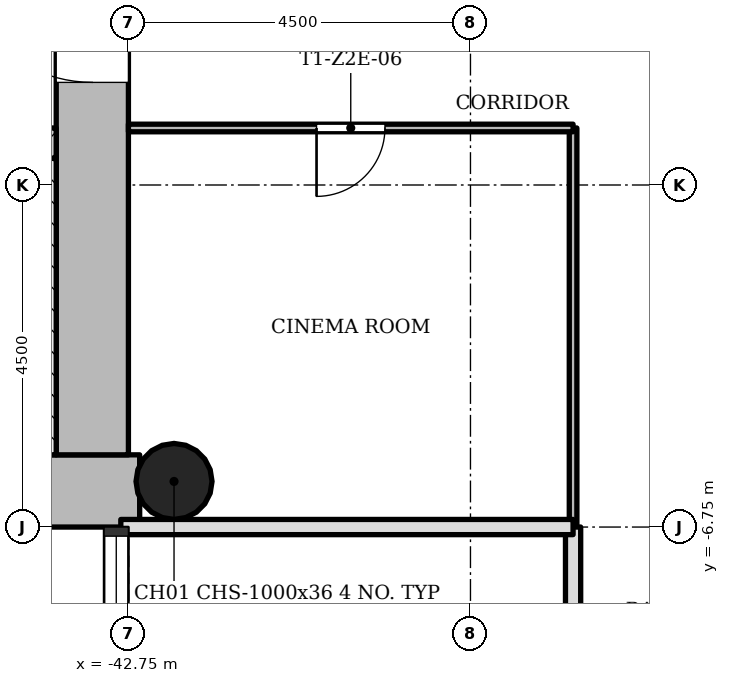
"""IFC4 building model, lengths in metres.
Left out: names, types, materials, properties, quantities, classifications, styles, units other than length and angle.
Written with IfcOpenShell. Run it as: python <this file> out.ifc"""

import sys

from ifc_helpers import new_model, si_unit, direction, frame, frame_2d, origin, origin_2d, place, context, subcontext, project, spatial, rectangle, hollow_circle, extrude, element, fill, save


model = new_model("IFC4")
c1 = context("Model", 3, precision=1e-05, world=origin(), true_north=direction((0.0, 1.0)))
c2 = subcontext(c1, "Body", "Model", "MODEL_VIEW")
j1 = project(units=[si_unit("LENGTHUNIT", "METRE"), si_unit("PLANEANGLEUNIT", "RADIAN")], contexts=[c1])
p1 = place(None, origin())
s1 = spatial("IfcSite", under=j1, at=p1, CompositionType="ELEMENT")
p2 = place(p1, origin())
s2 = spatial("IfcBuilding", under=s1, at=p2, CompositionType="ELEMENT")
p3 = place(p2, frame((0.0, 0.0, 103.8)))
s3 = spatial("IfcBuildingStorey", under=s2, at=p3, CompositionType="ELEMENT", Elevation=103.8)
p4 = place(p3, frame((-51.298, -6.275, 0.0), z_axis=(0.0, 0.0, 1.0), x_axis=(1.0, 0.0, 0.0)))
e1 = element("IfcWall", 1, at=p4, inside=s3, PredefinedType="SHEAR", context=c2, shape_type="SweptSolid", body=[
    extrude(rectangle(XDim=8.696, YDim=0.95, at=frame_2d((4.348, 0.0))), origin(), (0.0, 0.0, 1.0), 3.4),
])
p5 = place(p3, frame((-43.225, -5.8, 0.0), z_axis=(0.0, 0.0, 1.0), x_axis=(0.0, 1.0, 0.0)))
e2 = element("IfcWall", 2, at=p5, inside=s3, PredefinedType="SHEAR", context=c2, shape_type="SweptSolid", body=[
    extrude(rectangle(XDim=12.55, YDim=0.95, at=frame_2d((6.275, 0.0))), origin(), (0.0, 0.0, 1.0), 3.4),
])
p6 = place(p5, frame((4.9, 0.0, 0.0)))
e3 = element("IfcOpeningElement", 3, at=p6, cuts=e2, PredefinedType="OPENING", context=c2, shape_type="SweptSolid", body=[
    extrude(rectangle(XDim=1.8, YDim=2.1, at=frame_2d((0.9, 1.05))), frame((0.0, 0.485, 0.0), z_axis=(0.0, -1.0, 0.0), x_axis=(1.0, 0.0, 0.0)), (0.0, 0.0, 1.0), 0.97),
])
p7 = place(p3, frame((-50.8, -1.7, 0.0), z_axis=(0.0, 0.0, 1.0), x_axis=(1.0, 0.0, 0.0)))
e4 = element("IfcWall", 4, at=p7, inside=s3, PredefinedType="SHEAR", context=c2, shape_type="SweptSolid", body=[
    extrude(rectangle(XDim=7.1, YDim=0.4, at=frame_2d((3.55, 0.0))), origin(), (0.0, 0.0, 1.0), 3.4),
])
p8 = place(p7, frame((5.5, 0.0, 0.0)))
e5 = element("IfcOpeningElement", 5, at=p8, cuts=e4, PredefinedType="OPENING", context=c2, shape_type="SweptSolid", body=[
    extrude(rectangle(XDim=0.9, YDim=2.1, at=frame_2d((0.45, 1.05))), frame((0.0, 0.21, 0.0), z_axis=(0.0, -1.0, 0.0), x_axis=(1.0, 0.0, 0.0)), (0.0, 0.0, 1.0), 0.42),
])
p9 = place(p3, frame((-42.15, -6.15, 0.0), z_axis=(0.0, 0.0, 1.0), x_axis=(1.0, 0.0, 0.0)))
e6 = element("IfcColumn", 6, at=p9, inside=s3, PredefinedType="COLUMN", context=c2, shape_type="SweptSolid", body=[
    extrude(hollow_circle(Radius=0.5, WallThickness=0.036, at=origin_2d()), origin(), (0.0, 0.0, 1.0), 3.4),
])
p10 = place(p3, frame((-36.9, -6.75, 0.0), z_axis=(0.0, 0.0, 1.0), x_axis=(0.0, 1.0, 0.0)))
e7 = element("IfcWall", 7, at=p10, inside=s3, PredefinedType="PARTITIONING", context=c2, shape_type="SweptSolid", body=[
    extrude(rectangle(XDim=5.25, YDim=0.1, at=frame_2d((2.625, 0.0))), origin(), (0.0, 0.0, 1.0), 3.0),
])
p11 = place(p3, frame((-36.9, -8.55, 0.0), z_axis=(0.0, 0.0, 1.0), x_axis=(0.0, 1.0, 0.0)))
e8 = element("IfcWall", 8, at=p11, inside=s3, PredefinedType="SOLIDWALL", context=c2, shape_type="SweptSolid", body=[
    extrude(rectangle(XDim=1.8, YDim=0.2, at=frame_2d((0.9, 0.0))), origin(), (0.0, 0.0, 1.0), 3.0),
])
p12 = place(p3, frame((-42.85, -6.75, 0.0), z_axis=(0.0, 0.0, 1.0), x_axis=(1.0, 0.0, 0.0)))
e9 = element("IfcWall", 9, at=p12, inside=s3, PredefinedType="SOLIDWALL", context=c2, shape_type="SweptSolid", body=[
    extrude(rectangle(XDim=5.95, YDim=0.2, at=frame_2d((2.975, 0.0))), origin(), (0.0, 0.0, 1.0), 3.0),
])
p13 = place(p3, frame((-42.75, -1.5, 0.0), z_axis=(0.0, 0.0, 1.0), x_axis=(1.0, 0.0, 0.0)))
e10 = element("IfcWall", 10, at=p13, inside=s3, PredefinedType="PARTITIONING", context=c2, shape_type="SweptSolid", body=[
    extrude(rectangle(XDim=5.85, YDim=0.1, at=frame_2d((2.925, 0.0))), origin(), (0.0, 0.0, 1.0), 3.0),
])
p14 = place(p13, frame((2.475, 0.0, 0.0)))
e11 = element("IfcOpeningElement", 11, at=p14, cuts=e10, PredefinedType="OPENING", context=c2, shape_type="SweptSolid", body=[
    extrude(rectangle(XDim=0.9, YDim=2.1, at=frame_2d((0.45, 1.05))), frame((0.0, 0.06, 0.0), z_axis=(0.0, -1.0, 0.0), x_axis=(1.0, 0.0, 0.0)), (0.0, 0.0, 1.0), 0.12),
])
p15 = place(p3, frame((-43.825, -1.9, 0.0), z_axis=(0.0, 0.0, 1.0), x_axis=(0.0, -1.0, 0.0)))
e12 = element("IfcWall", 12, at=p15, inside=s3, PredefinedType="SHEAR", context=c2, shape_type="SweptSolid", body=[
    extrude(rectangle(XDim=3.9, YDim=0.25, at=frame_2d((1.95, 0.0))), origin(), (0.0, 0.0, 1.0), 3.4),
])
p16 = place(p14, origin())
e13 = element("IfcDoor", 13, at=p16, inside=s3, OperationType="SINGLE_SWING_LEFT", PredefinedType="DOOR", context=c2, shape_type="SweptSolid", body=[
    extrude(rectangle(XDim=0.9, YDim=2.1, at=frame_2d((0.45, 1.05))), frame((0.0, 0.025, 0.0), z_axis=(0.0, -1.0, 0.0), x_axis=(1.0, 0.0, 0.0)), (0.0, 0.0, 1.0), 0.05),
])
fill(e11, e13)
p17 = place(p6, origin())
e14 = element("IfcDoor", 14, at=p17, inside=s3, OperationType="SINGLE_SWING_LEFT", PredefinedType="DOOR", context=c2, shape_type="SweptSolid", body=[
    extrude(rectangle(XDim=1.8, YDim=2.1, at=frame_2d((0.9, 1.05))), frame((0.0, 0.025, 0.0), z_axis=(0.0, -1.0, 0.0), x_axis=(1.0, 0.0, 0.0)), (0.0, 0.0, 1.0), 0.05),
])
fill(e3, e14)
save(model, sys.argv[1])
